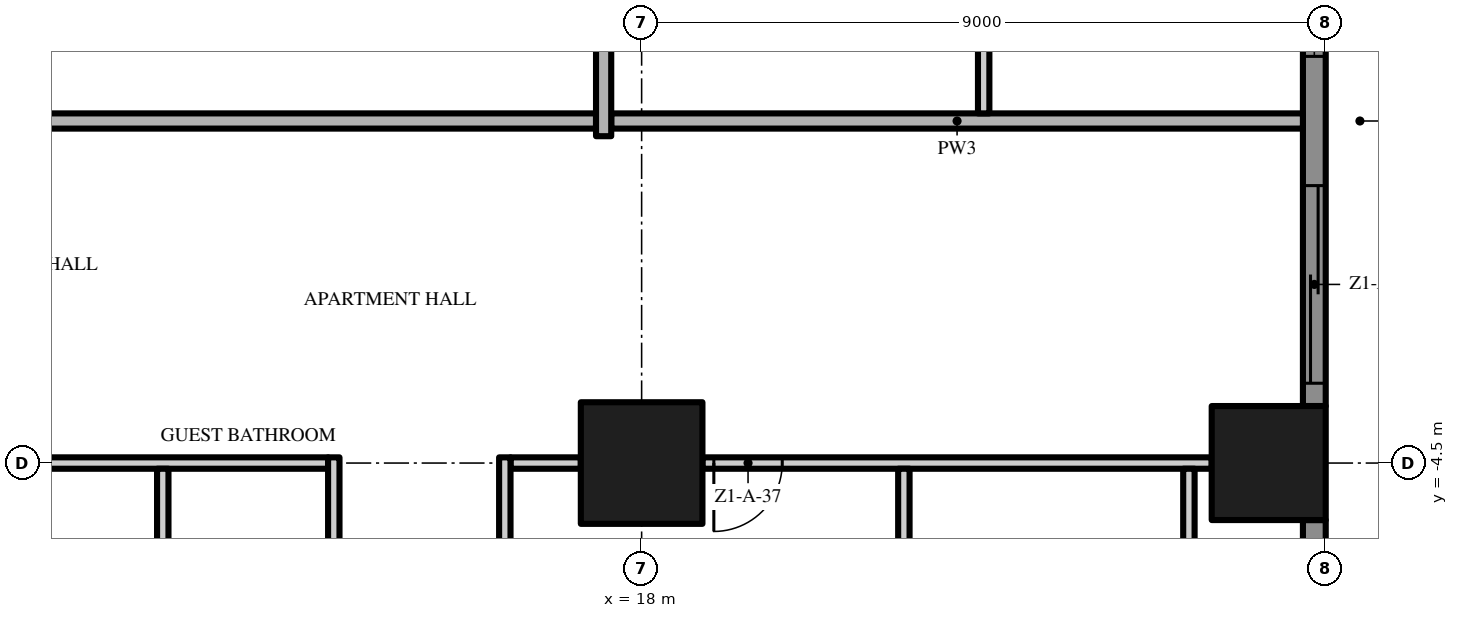
"""IFC4 building model, lengths in metres.
Left out: names, types, materials, properties, quantities, classifications, styles, units other than length and angle.
Written with IfcOpenShell. Run it as: python <this file> out.ifc"""

import sys

from ifc_helpers import new_model, si_unit, direction, frame, frame_2d, origin, origin_2d, place, context, subcontext, project, spatial, polyline, rectangle, outline, extrude, element, fill, save


model = new_model("IFC4")
c1 = context("Model", 3, precision=1e-05, world=origin(), true_north=direction((0.0, 1.0)))
c2 = subcontext(c1, "Body", "Model", "MODEL_VIEW")
j1 = project(units=[si_unit("LENGTHUNIT", "METRE"), si_unit("PLANEANGLEUNIT", "RADIAN")], contexts=[c1])
p1 = place(None, origin())
s1 = spatial("IfcSite", under=j1, at=p1, CompositionType="ELEMENT")
p2 = place(p1, origin())
s2 = spatial("IfcBuilding", under=s1, at=p2, CompositionType="ELEMENT")
p3 = place(p2, frame((0.0, 0.0, 18.8)))
s3 = spatial("IfcBuildingStorey", under=s2, at=p3, CompositionType="ELEMENT", Elevation=18.8)
p4 = place(p3, frame((18.0, -4.5, 0.0), z_axis=(0.0, 0.0, 1.0), x_axis=(1.0, 0.0, 0.0)))
e1 = element("IfcColumn", 1, at=p4, inside=s3, PredefinedType="COLUMN", context=c2, shape_type="SweptSolid", body=[
    extrude(rectangle(XDim=1.6, YDim=1.6, at=origin_2d()), origin(), (0.0, 0.0, 1.0), 3.5),
])
p5 = place(p3, frame((26.25, -4.5, 0.0), z_axis=(0.0, 0.0, 1.0), x_axis=(1.0, 0.0, 0.0)))
e2 = element("IfcColumn", 2, at=p5, inside=s3, PredefinedType="COLUMN", context=c2, shape_type="SweptSolid", body=[
    extrude(rectangle(XDim=1.5, YDim=1.5, at=origin_2d()), origin(), (0.0, 0.0, 1.0), 3.5),
])
p6 = place(p3, frame((26.85, -5.25, 0.0), z_axis=(0.0, 0.0, 1.0), x_axis=(0.0, -1.0, 0.0)))
e3 = element("IfcWall", 3, at=p6, inside=s3, PredefinedType="SOLIDWALL", context=c2, shape_type="SweptSolid", body=[
    extrude(rectangle(XDim=7.5, YDim=0.3, at=frame_2d((3.75, 0.0))), origin(), (0.0, 0.0, 1.0), 3.5),
])
p7 = place(p6, frame((4.6, 0.0, 0.45)))
e4 = element("IfcOpeningElement", 4, at=p7, cuts=e3, PredefinedType="OPENING", context=c2, shape_type="SweptSolid", body=[
    extrude(rectangle(XDim=2.6, YDim=2.65, at=frame_2d((1.3, 1.325))), frame((0.0, 0.16, 0.0), z_axis=(0.0, -1.0, 0.0), x_axis=(1.0, 0.0, 0.0)), (0.0, 0.0, 1.0), 0.32),
])
p8 = place(p6, frame((0.3, 0.0, 0.45)))
e5 = element("IfcOpeningElement", 5, at=p8, cuts=e3, PredefinedType="OPENING", context=c2, shape_type="SweptSolid", body=[
    extrude(rectangle(XDim=2.6, YDim=2.65, at=frame_2d((1.3, 1.325))), frame((0.0, 0.16, 0.0), z_axis=(0.0, -1.0, 0.0), x_axis=(1.0, 0.0, 0.0)), (0.0, 0.0, 1.0), 0.32),
])
p9 = place(p3, frame((26.85, 3.75, 0.0), z_axis=(0.0, 0.0, 1.0), x_axis=(0.0, -1.0, 0.0)))
e6 = element("IfcWall", 6, at=p9, inside=s3, PredefinedType="SOLIDWALL", context=c2, shape_type="SweptSolid", body=[
    extrude(rectangle(XDim=7.5, YDim=0.3, at=frame_2d((3.75, 0.0))), origin(), (0.0, 0.0, 1.0), 3.5),
])
p10 = place(p9, frame((4.6, 0.0, 0.0)))
e7 = element("IfcOpeningElement", 7, at=p10, cuts=e6, PredefinedType="OPENING", context=c2, shape_type="SweptSolid", body=[
    extrude(rectangle(XDim=2.6, YDim=2.4, at=frame_2d((1.3, 1.2))), frame((0.0, 0.16, 0.0), z_axis=(0.0, -1.0, 0.0), x_axis=(1.0, 0.0, 0.0)), (0.0, 0.0, 1.0), 0.32),
])
p11 = place(p9, frame((0.3, 0.0, 0.45)))
e8 = element("IfcOpeningElement", 8, at=p11, cuts=e6, PredefinedType="OPENING", context=c2, shape_type="SweptSolid", body=[
    extrude(rectangle(XDim=2.6, YDim=2.65, at=frame_2d((1.3, 1.325))), frame((0.0, 0.16, 0.0), z_axis=(0.0, -1.0, 0.0), x_axis=(1.0, 0.0, 0.0)), (0.0, 0.0, 1.0), 0.32),
])
p12 = place(p3, origin())
e9 = element("IfcWall", 9, at=p12, inside=s3, PredefinedType="USERDEFINED", context=c2, shape_type="SweptSolid", body=[
    extrude(outline(polyline([(29.649, -18.0), (29.985, -16.5), (30.0, -16.125), (29.869, -15.0), (29.345, -13.5), (28.612, -12.0), (27.951, -10.5), (27.615, -9.0), (27.6, -8.625), (27.731, -7.5), (28.255, -6.0), (28.988, -4.5), (29.649, -3.0), (29.985, -1.5), (30.0, -1.125), (29.869, 0.0), (29.345, 1.5), (28.612, 3.0), (27.951, 4.5), (27.615, 6.0), (27.6, 6.375), (27.731, 7.5), (28.255, 9.0), (28.988, 10.5), (29.649, 12.0), (29.985, 13.5), (30.0, 13.875), (29.869, 15.0), (29.345, 16.5), (28.612, 18.0), (28.388, 17.89), (29.114, 16.404), (29.624, 14.944), (29.749, 13.865), (29.736, 13.533), (29.41, 12.079), (28.761, 10.605), (28.024, 9.096), (27.486, 7.556), (27.349, 6.385), (27.366, 5.967), (27.713, 4.421), (28.385, 2.895), (29.114, 1.404), (29.624, -0.056), (29.749, -1.135), (29.736, -1.467), (29.41, -2.921), (28.761, -4.395), (28.024, -5.904), (27.486, -7.444), (27.349, -8.615), (27.366, -9.033), (27.713, -10.579), (28.385, -12.105), (29.114, -13.596), (29.624, -15.056), (29.749, -16.135), (29.736, -16.467), (29.405, -17.945), (29.649, -18.0)])), origin(), (0.0, 0.0, 1.0), 0.9),
])
p13 = place(p3, frame((9.8, -4.5, 0.0), z_axis=(0.0, 0.0, 1.0), x_axis=(1.0, 0.0, 0.0)))
e10 = element("IfcWall", 10, at=p13, inside=s3, PredefinedType="PARTITIONING", context=c2, shape_type="SweptSolid", body=[
    extrude(rectangle(XDim=4.075, YDim=0.15, at=frame_2d((2.038, 0.0))), origin(), (0.0, 0.0, 1.0), 3.5),
])
p14 = place(p3, frame((16.275, -4.5, 0.0), z_axis=(0.0, 0.0, 1.0), x_axis=(1.0, 0.0, 0.0)))
e11 = element("IfcWall", 11, at=p14, inside=s3, PredefinedType="PARTITIONING", context=c2, shape_type="SweptSolid", body=[
    extrude(rectangle(XDim=0.925, YDim=0.15, at=frame_2d((0.463, 0.0))), origin(), (0.0, 0.0, 1.0), 3.5),
])
p15 = place(p3, frame((25.5, -4.5, 0.0), z_axis=(0.0, 0.0, 1.0), x_axis=(-1.0, 0.0, 0.0)))
e12 = element("IfcWall", 12, at=p15, inside=s3, PredefinedType="PARTITIONING", context=c2, shape_type="SweptSolid", body=[
    extrude(rectangle(XDim=6.7, YDim=0.15, at=frame_2d((3.35, 0.0))), origin(), (0.0, 0.0, 1.0), 3.5),
])
p16 = place(p15, frame((5.65, 0.0, 0.0)))
e13 = element("IfcOpeningElement", 13, at=p16, cuts=e12, PredefinedType="OPENING", context=c2, shape_type="SweptSolid", body=[
    extrude(rectangle(XDim=0.9, YDim=2.1, at=frame_2d((0.45, 1.05))), frame((0.0, 0.085, 0.0), z_axis=(0.0, -1.0, 0.0), x_axis=(1.0, 0.0, 0.0)), (0.0, 0.0, 1.0), 0.17),
])
p17 = place(p3, frame((17.4, 0.0, 0.0), z_axis=(0.0, 0.0, 1.0), x_axis=(-1.0, 0.0, 0.0)))
e14 = element("IfcWall", 14, at=p17, inside=s3, PredefinedType="PARTITIONING", context=c2, shape_type="SweptSolid", body=[
    extrude(rectangle(XDim=17.3, YDim=0.2, at=frame_2d((8.65, 0.0))), origin(), (0.0, 0.0, 1.0), 3.5),
])
p18 = place(p17, frame((7.65, 0.0, 0.0)))
e15 = element("IfcOpeningElement", 15, at=p18, cuts=e14, PredefinedType="OPENING", context=c2, shape_type="SweptSolid", body=[
    extrude(rectangle(XDim=1.5, YDim=2.4, at=frame_2d((0.75, 1.2))), frame((0.0, 0.11, 0.0), z_axis=(0.0, -1.0, 0.0), x_axis=(1.0, 0.0, 0.0)), (0.0, 0.0, 1.0), 0.22),
])
p19 = place(p3, frame((17.6, 0.0, 0.0), z_axis=(0.0, 0.0, 1.0), x_axis=(1.0, 0.0, 0.0)))
e16 = element("IfcWall", 16, at=p19, inside=s3, PredefinedType="PARTITIONING", context=c2, shape_type="SweptSolid", body=[
    extrude(rectangle(XDim=9.1, YDim=0.2, at=frame_2d((4.55, 0.0))), origin(), (0.0, 0.0, 1.0), 3.5),
])
p20 = place(p3, frame((11.7, -8.925, 0.0), z_axis=(0.0, 0.0, 1.0), x_axis=(0.0, 1.0, 0.0)))
e17 = element("IfcWall", 17, at=p20, inside=s3, PredefinedType="PARTITIONING", context=c2, shape_type="SweptSolid", body=[
    extrude(rectangle(XDim=4.35, YDim=0.15, at=frame_2d((2.175, 0.0))), origin(), (0.0, 0.0, 1.0), 3.5),
])
p21 = place(p3, frame((13.95, -9.075, 0.0), z_axis=(0.0, 0.0, 1.0), x_axis=(0.0, 1.0, 0.0)))
e18 = element("IfcWall", 18, at=p21, inside=s3, PredefinedType="PARTITIONING", context=c2, shape_type="SweptSolid", body=[
    extrude(rectangle(XDim=4.65, YDim=0.15, at=frame_2d((2.325, 0.0))), origin(), (0.0, 0.0, 1.0), 3.5),
])
p22 = place(p21, frame((1.875, 0.0, 0.0)))
e19 = element("IfcOpeningElement", 19, at=p22, cuts=e18, PredefinedType="OPENING", context=c2, shape_type="SweptSolid", body=[
    extrude(rectangle(XDim=0.9, YDim=2.1, at=frame_2d((0.45, 1.05))), frame((0.0, 0.085, 0.0), z_axis=(0.0, -1.0, 0.0), x_axis=(1.0, 0.0, 0.0)), (0.0, 0.0, 1.0), 0.17),
])
p23 = place(p3, frame((16.2, -9.075, 0.0), z_axis=(0.0, 0.0, 1.0), x_axis=(0.0, 1.0, 0.0)))
e20 = element("IfcWall", 20, at=p23, inside=s3, PredefinedType="PARTITIONING", context=c2, shape_type="SweptSolid", body=[
    extrude(rectangle(XDim=4.65, YDim=0.15, at=frame_2d((2.325, 0.0))), origin(), (0.0, 0.0, 1.0), 3.5),
])
p24 = place(p3, frame((17.5, -0.2, 0.0), z_axis=(0.0, 0.0, 1.0), x_axis=(0.0, 1.0, 0.0)))
e21 = element("IfcWall", 21, at=p24, inside=s3, PredefinedType="PARTITIONING", context=c2, shape_type="SweptSolid", body=[
    extrude(rectangle(XDim=3.9, YDim=0.2, at=frame_2d((1.95, 0.0))), origin(), (0.0, 0.0, 1.0), 3.5),
])
p25 = place(p3, frame((21.45, -4.575, 0.0), z_axis=(0.0, 0.0, 1.0), x_axis=(0.0, -1.0, 0.0)))
e22 = element("IfcWall", 22, at=p25, inside=s3, PredefinedType="PARTITIONING", context=c2, shape_type="SweptSolid", body=[
    extrude(rectangle(XDim=4.35, YDim=0.15, at=frame_2d((2.175, 0.0))), origin(), (0.0, 0.0, 1.0), 3.5),
])
p26 = place(p25, frame((1.7, 0.0, 0.0)))
e23 = element("IfcOpeningElement", 23, at=p26, cuts=e22, PredefinedType="OPENING", context=c2, shape_type="SweptSolid", body=[
    extrude(rectangle(XDim=0.9, YDim=2.1, at=frame_2d((0.45, 1.05))), frame((0.0, 0.085, 0.0), z_axis=(0.0, -1.0, 0.0), x_axis=(1.0, 0.0, 0.0)), (0.0, 0.0, 1.0), 0.17),
])
p27 = place(p3, frame((22.5, 17.25, 0.0), z_axis=(0.0, 0.0, 1.0), x_axis=(0.0, -1.0, 0.0)))
e24 = element("IfcWall", 24, at=p27, inside=s3, PredefinedType="PARTITIONING", context=c2, shape_type="SweptSolid", body=[
    extrude(rectangle(XDim=17.15, YDim=0.15, at=frame_2d((8.575, 0.0))), origin(), (0.0, 0.0, 1.0), 3.5),
])
p28 = place(p27, frame((14.5, 0.0, 0.0)))
e25 = element("IfcOpeningElement", 25, at=p28, cuts=e24, PredefinedType="OPENING", context=c2, shape_type="SweptSolid", body=[
    extrude(rectangle(XDim=1.0, YDim=2.4, at=frame_2d((0.5, 1.2))), frame((0.0, 0.085, 0.0), z_axis=(0.0, -1.0, 0.0), x_axis=(1.0, 0.0, 0.0)), (0.0, 0.0, 1.0), 0.17),
])
p29 = place(p27, frame((8.9, 0.0, 0.0)))
e26 = element("IfcOpeningElement", 26, at=p29, cuts=e24, PredefinedType="OPENING", context=c2, shape_type="SweptSolid", body=[
    extrude(rectangle(XDim=1.0, YDim=2.4, at=frame_2d((0.5, 1.2))), frame((0.0, 0.085, 0.0), z_axis=(0.0, -1.0, 0.0), x_axis=(1.0, 0.0, 0.0)), (0.0, 0.0, 1.0), 0.17),
])
p30 = place(p27, frame((6.65, 0.0, 0.0)))
e27 = element("IfcOpeningElement", 27, at=p30, cuts=e24, PredefinedType="OPENING", context=c2, shape_type="SweptSolid", body=[
    extrude(rectangle(XDim=1.0, YDim=2.4, at=frame_2d((0.5, 1.2))), frame((0.0, 0.085, 0.0), z_axis=(0.0, -1.0, 0.0), x_axis=(1.0, 0.0, 0.0)), (0.0, 0.0, 1.0), 0.17),
])
p31 = place(p27, frame((0.15, 0.0, 0.0)))
e28 = element("IfcOpeningElement", 28, at=p31, cuts=e24, PredefinedType="OPENING", context=c2, shape_type="SweptSolid", body=[
    extrude(rectangle(XDim=1.0, YDim=2.4, at=frame_2d((0.5, 1.2))), frame((0.0, 0.085, 0.0), z_axis=(0.0, -1.0, 0.0), x_axis=(1.0, 0.0, 0.0)), (0.0, 0.0, 1.0), 0.17),
])
p32 = place(p3, frame((25.2, -8.925, 0.0), z_axis=(0.0, 0.0, 1.0), x_axis=(0.0, 1.0, 0.0)))
e29 = element("IfcWall", 29, at=p32, inside=s3, PredefinedType="PARTITIONING", context=c2, shape_type="SweptSolid", body=[
    extrude(rectangle(XDim=4.35, YDim=0.15, at=frame_2d((2.175, 0.0))), origin(), (0.0, 0.0, 1.0), 3.5),
])
p33 = place(p10, origin())
e30 = element("IfcDoor", 30, at=p33, inside=s3, OperationType="SINGLE_SWING_LEFT", PredefinedType="DOOR", context=c2, shape_type="SweptSolid", body=[
    extrude(rectangle(XDim=2.6, YDim=2.4, at=frame_2d((1.3, 1.2))), frame((0.0, 0.025, 0.0), z_axis=(0.0, -1.0, 0.0), x_axis=(1.0, 0.0, 0.0)), (0.0, 0.0, 1.0), 0.05),
])
fill(e7, e30)
p34 = place(p11, origin())
e31 = element("IfcWindow", 31, at=p34, inside=s3, PartitioningType="SINGLE_PANEL", PredefinedType="WINDOW", context=c2, shape_type="SweptSolid", body=[
    extrude(rectangle(XDim=2.6, YDim=2.65, at=frame_2d((1.3, 1.325))), frame((0.0, 0.03, 0.0), z_axis=(0.0, -1.0, 0.0), x_axis=(1.0, 0.0, 0.0)), (0.0, 0.0, 1.0), 0.06),
])
fill(e8, e31)
p35 = place(p16, origin())
e32 = element("IfcDoor", 32, at=p35, inside=s3, OperationType="SINGLE_SWING_RIGHT", PredefinedType="DOOR", context=c2, shape_type="SweptSolid", body=[
    extrude(rectangle(XDim=0.9, YDim=2.1, at=frame_2d((0.45, 1.05))), frame((0.0, 0.025, 0.0), z_axis=(0.0, -1.0, 0.0), x_axis=(1.0, 0.0, 0.0)), (0.0, 0.0, 1.0), 0.05),
])
fill(e13, e32)
save(model, sys.argv[1])
